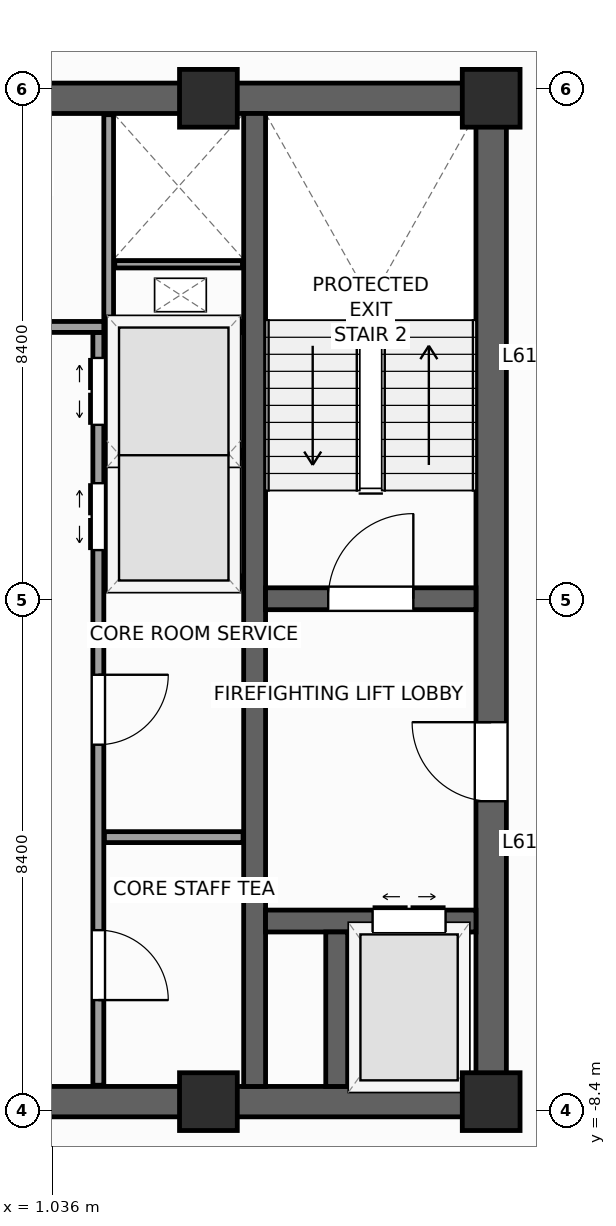
"""IFC4 building model, lengths in metres.
Left out: names, types, materials, properties, quantities, classifications, styles, units other than length and angle.
Written with IfcOpenShell. Run it as: python <this file> out.ifc"""

import sys

from ifc_helpers import new_model, si_unit, direction, frame, frame_2d, origin, origin_2d, place, context, subcontext, project, spatial, rectangle, extrude, source, transform, mapped, element, fill, save


model = new_model("IFC4")
c1 = context("Model", 3, precision=1e-05, world=origin(), true_north=direction((0.0, 1.0)))
c2 = subcontext(c1, "Body", "Model", "MODEL_VIEW")
j1 = project(units=[si_unit("LENGTHUNIT", "METRE"), si_unit("PLANEANGLEUNIT", "RADIAN")], contexts=[c1])
p1 = place(None, origin())
s1 = spatial("IfcSite", under=j1, at=p1, CompositionType="ELEMENT")
p2 = place(p1, origin())
s2 = spatial("IfcBuilding", under=s1, at=p2, CompositionType="ELEMENT")
p3 = place(p2, frame((0.0, 0.0, 252.4)))
s3 = spatial("IfcBuildingStorey", under=s2, at=p3, CompositionType="ELEMENT", Elevation=252.4)
p4 = place(p3, frame((-8.5, -8.25, 0.0), z_axis=(0.0, 0.0, 1.0), x_axis=(1.0, 0.0, 0.0)))
e1 = element("IfcWall", 1, at=p4, inside=s3, PredefinedType="SHEAR", context=c2, shape_type="SweptSolid", body=[
    extrude(rectangle(XDim=17.0, YDim=0.5, at=frame_2d((8.5, 0.0))), origin(), (0.0, 0.0, 1.0), 3.9),
])
p5 = place(p4, frame((7.85, 0.0, 0.0)))
e2 = element("IfcOpeningElement", 2, at=p5, cuts=e1, PredefinedType="OPENING", context=c2, shape_type="SweptSolid", body=[
    extrude(rectangle(XDim=1.3, YDim=2.2, at=frame_2d((0.65, 1.1))), frame((0.0, 0.26, 0.0), z_axis=(0.0, -1.0, 0.0), x_axis=(1.0, 0.0, 0.0)), (0.0, 0.0, 1.0), 0.52),
])
p6 = place(p3, frame((-8.5, 8.25, 0.0), z_axis=(0.0, 0.0, 1.0), x_axis=(1.0, 0.0, 0.0)))
e3 = element("IfcWall", 3, at=p6, inside=s3, PredefinedType="SHEAR", context=c2, shape_type="SweptSolid", body=[
    extrude(rectangle(XDim=17.0, YDim=0.5, at=frame_2d((8.5, 0.0))), origin(), (0.0, 0.0, 1.0), 3.9),
])
p7 = place(p3, frame((8.25, -8.0, 0.0), z_axis=(0.0, 0.0, 1.0), x_axis=(0.0, 1.0, 0.0)))
e4 = element("IfcWall", 4, at=p7, inside=s3, PredefinedType="SHEAR", context=c2, shape_type="SweptSolid", body=[
    extrude(rectangle(XDim=16.0, YDim=0.5, at=frame_2d((8.0, 0.0))), origin(), (0.0, 0.0, 1.0), 3.9),
])
p8 = place(p7, frame((4.69, 0.0, 0.0)))
e5 = element("IfcOpeningElement", 5, at=p8, cuts=e4, PredefinedType="OPENING", context=c2, shape_type="SweptSolid", body=[
    extrude(rectangle(XDim=1.3, YDim=2.2, at=frame_2d((0.65, 1.1))), frame((0.0, 0.26, 0.0), z_axis=(0.0, -1.0, 0.0), x_axis=(1.0, 0.0, 0.0)), (0.0, 0.0, 1.0), 0.52),
])
p9 = place(p3, frame((4.36, -8.0, 0.0), z_axis=(0.0, 0.0, 1.0), x_axis=(0.0, 1.0, 0.0)))
e6 = element("IfcWall", 6, at=p9, inside=s3, PredefinedType="SHEAR", context=c2, shape_type="SweptSolid", body=[
    extrude(rectangle(XDim=16.0, YDim=0.36, at=frame_2d((8.0, 0.0))), origin(), (0.0, 0.0, 1.0), 3.9),
])
p10 = place(p3, frame((4.54, 0.02, 0.0), z_axis=(0.0, 0.0, 1.0), x_axis=(1.0, 0.0, 0.0)))
e7 = element("IfcWall", 7, at=p10, inside=s3, PredefinedType="SHEAR", context=c2, shape_type="SweptSolid", body=[
    extrude(rectangle(XDim=3.46, YDim=0.36, at=frame_2d((1.73, 0.0))), origin(), (0.0, 0.0, 1.0), 3.9),
])
p11 = place(p10, frame((1.03, 0.0, 0.0)))
e8 = element("IfcOpeningElement", 8, at=p11, cuts=e7, PredefinedType="OPENING", context=c2, shape_type="SweptSolid", body=[
    extrude(rectangle(XDim=1.4, YDim=2.2, at=frame_2d((0.7, 1.1))), frame((0.0, 0.19, 0.0), z_axis=(0.0, -1.0, 0.0), x_axis=(1.0, 0.0, 0.0)), (0.0, 0.0, 1.0), 0.38),
])
p12 = place(p3, frame((4.54, -5.28, 0.0), z_axis=(0.0, 0.0, 1.0), x_axis=(1.0, 0.0, 0.0)))
e9 = element("IfcWall", 9, at=p12, inside=s3, PredefinedType="SHEAR", context=c2, shape_type="SweptSolid", body=[
    extrude(rectangle(XDim=3.46, YDim=0.36, at=frame_2d((1.73, 0.0))), origin(), (0.0, 0.0, 1.0), 3.9),
])
p13 = place(p12, frame((1.76, 0.0, 0.0)))
e10 = element("IfcOpeningElement", 10, at=p13, cuts=e9, PredefinedType="OPENING", context=c2, shape_type="SweptSolid", body=[
    extrude(rectangle(XDim=1.2, YDim=2.25, at=frame_2d((0.6, 1.125))), frame((0.0, 0.19, 0.0), z_axis=(0.0, -1.0, 0.0), x_axis=(1.0, 0.0, 0.0)), (0.0, 0.0, 1.0), 0.38),
])
p14 = place(p3, frame((5.71, -8.0, 0.0), z_axis=(0.0, 0.0, 1.0), x_axis=(0.0, 1.0, 0.0)))
e11 = element("IfcWall", 11, at=p14, inside=s3, PredefinedType="SHEAR", context=c2, shape_type="SweptSolid", body=[
    extrude(rectangle(XDim=2.54, YDim=0.36, at=frame_2d((1.27, 0.0))), origin(), (0.0, 0.0, 1.0), 3.9),
])
m1 = source(origin(), c2, "Body", "SweptSolid", [
    extrude(rectangle(XDim=0.95, YDim=0.95, at=origin_2d()), origin(), (0.0, 0.0, 1.0), 3.9),
])
for number, where, z_axis, x_axis in (
    (12, (8.25, -8.25, 0.0), (0.0, 0.0, 1.0), (1.0, 0.0, 0.0)),
    (13, (8.25, 8.25, 0.0), (0.0, 0.0, 1.0), (1.0, 0.0, 0.0)),
    (14, (3.6, -8.25, 0.0), (0.0, 0.0, 1.0), (1.0, 0.0, 0.0)),
    (15, (3.6, 8.25, 0.0), (0.0, 0.0, 1.0), (1.0, 0.0, 0.0)),
):
    element("IfcColumn", number, at=place(p3, frame(where, z_axis=z_axis, x_axis=x_axis)), inside=s3, PredefinedType="PILASTER", context=c2, shape_type="MappedRepresentation", body=[
        mapped(m1, transform((0.0, 0.0, 0.0), scale=1.0)),
    ])
p15 = place(p3, frame((6.733, -29.154, 0.0), z_axis=(0.0, 0.0, 1.0), x_axis=(0.629325378072, 0.77714192302, 0.0)))
e16 = element("IfcWall", 16, at=p15, inside=s3, PredefinedType="STANDARD", context=c2, shape_type="SweptSolid", body=[
    extrude(rectangle(XDim=36.84, YDim=0.34, at=frame_2d((18.42, 0.0))), origin(), (0.0, 0.0, 1.0), 2.96),
])
p16 = place(p15, frame((3.721, 0.0, 0.48)))
e17 = element("IfcOpeningElement", 17, at=p16, cuts=e16, PredefinedType="OPENING", context=c2, shape_type="SweptSolid", body=[
    extrude(rectangle(XDim=1.4, YDim=2.4, at=frame_2d((0.7, 1.2))), frame((0.0, 0.18, 0.0), z_axis=(0.0, -1.0, 0.0), x_axis=(1.0, 0.0, 0.0)), (0.0, 0.0, 1.0), 0.36),
])
p17 = place(p15, frame((10.559, 0.0, 0.58)))
e18 = element("IfcOpeningElement", 18, at=p17, cuts=e16, PredefinedType="OPENING", context=c2, shape_type="SweptSolid", body=[
    extrude(rectangle(XDim=1.75, YDim=2.3, at=frame_2d((0.875, 1.15))), frame((0.0, 0.18, 0.0), z_axis=(0.0, -1.0, 0.0), x_axis=(1.0, 0.0, 0.0)), (0.0, 0.0, 1.0), 0.36),
])
p18 = place(p15, frame((16.058, 0.0, 0.58)))
e19 = element("IfcOpeningElement", 19, at=p18, cuts=e16, PredefinedType="OPENING", context=c2, shape_type="SweptSolid", body=[
    extrude(rectangle(XDim=1.75, YDim=2.3, at=frame_2d((0.875, 1.15))), frame((0.0, 0.18, 0.0), z_axis=(0.0, -1.0, 0.0), x_axis=(1.0, 0.0, 0.0)), (0.0, 0.0, 1.0), 0.36),
])
p19 = place(p15, frame((24.176, 0.0, 0.58)))
e20 = element("IfcOpeningElement", 20, at=p19, cuts=e16, PredefinedType="OPENING", context=c2, shape_type="SweptSolid", body=[
    extrude(rectangle(XDim=1.75, YDim=2.3, at=frame_2d((0.875, 1.15))), frame((0.0, 0.18, 0.0), z_axis=(0.0, -1.0, 0.0), x_axis=(1.0, 0.0, 0.0)), (0.0, 0.0, 1.0), 0.36),
])
p20 = place(p15, frame((30.982, 0.0, 0.48)))
e21 = element("IfcOpeningElement", 21, at=p20, cuts=e16, PredefinedType="OPENING", context=c2, shape_type="SweptSolid", body=[
    extrude(rectangle(XDim=1.4, YDim=2.4, at=frame_2d((0.7, 1.2))), frame((0.0, 0.18, 0.0), z_axis=(0.0, -1.0, 0.0), x_axis=(1.0, 0.0, 0.0)), (0.0, 0.0, 1.0), 0.36),
])
p21 = place(p3, frame((29.154, 6.733, 0.0), z_axis=(0.0, 0.0, 1.0), x_axis=(-0.77714192302, 0.629325378072, 0.0)))
e22 = element("IfcWall", 22, at=p21, inside=s3, PredefinedType="STANDARD", context=c2, shape_type="SweptSolid", body=[
    extrude(rectangle(XDim=36.84, YDim=0.34, at=frame_2d((18.42, 0.0))), origin(), (0.0, 0.0, 1.0), 2.96),
])
p22 = place(p21, frame((23.495, 0.0, 0.0)))
e23 = element("IfcOpeningElement", 23, at=p22, cuts=e22, PredefinedType="OPENING", context=c2, shape_type="SweptSolid", body=[
    extrude(rectangle(XDim=1.05, YDim=2.25, at=frame_2d((0.525, 1.125))), frame((0.0, 0.18, 0.0), z_axis=(0.0, -1.0, 0.0), x_axis=(1.0, 0.0, 0.0)), (0.0, 0.0, 1.0), 0.36),
])
p23 = place(p21, frame((3.721, 0.0, 0.48)))
e24 = element("IfcOpeningElement", 24, at=p23, cuts=e22, PredefinedType="OPENING", context=c2, shape_type="SweptSolid", body=[
    extrude(rectangle(XDim=1.4, YDim=2.4, at=frame_2d((0.7, 1.2))), frame((0.0, 0.18, 0.0), z_axis=(0.0, -1.0, 0.0), x_axis=(1.0, 0.0, 0.0)), (0.0, 0.0, 1.0), 0.36),
])
p24 = place(p21, frame((9.809, 0.0, 0.58)))
e25 = element("IfcOpeningElement", 25, at=p24, cuts=e22, PredefinedType="OPENING", context=c2, shape_type="SweptSolid", body=[
    extrude(rectangle(XDim=1.75, YDim=2.3, at=frame_2d((0.875, 1.15))), frame((0.0, 0.18, 0.0), z_axis=(0.0, -1.0, 0.0), x_axis=(1.0, 0.0, 0.0)), (0.0, 0.0, 1.0), 0.36),
])
p25 = place(p21, frame((16.058, 0.0, 0.58)))
e26 = element("IfcOpeningElement", 26, at=p25, cuts=e22, PredefinedType="OPENING", context=c2, shape_type="SweptSolid", body=[
    extrude(rectangle(XDim=1.75, YDim=2.3, at=frame_2d((0.875, 1.15))), frame((0.0, 0.18, 0.0), z_axis=(0.0, -1.0, 0.0), x_axis=(1.0, 0.0, 0.0)), (0.0, 0.0, 1.0), 0.36),
])
p26 = place(p21, frame((25.676, 0.0, 0.58)))
e27 = element("IfcOpeningElement", 27, at=p26, cuts=e22, PredefinedType="OPENING", context=c2, shape_type="SweptSolid", body=[
    extrude(rectangle(XDim=1.75, YDim=2.3, at=frame_2d((0.875, 1.15))), frame((0.0, 0.18, 0.0), z_axis=(0.0, -1.0, 0.0), x_axis=(1.0, 0.0, 0.0)), (0.0, 0.0, 1.0), 0.36),
])
p27 = place(p21, frame((31.732, 0.0, 0.48)))
e28 = element("IfcOpeningElement", 28, at=p27, cuts=e22, PredefinedType="OPENING", context=c2, shape_type="SweptSolid", body=[
    extrude(rectangle(XDim=1.4, YDim=2.4, at=frame_2d((0.7, 1.2))), frame((0.0, 0.18, 0.0), z_axis=(0.0, -1.0, 0.0), x_axis=(1.0, 0.0, 0.0)), (0.0, 0.0, 1.0), 0.36),
])
p28 = place(p3, frame((1.79, -7.98, 0.0), z_axis=(0.0, 0.0, 1.0), x_axis=(0.0, 1.0, 0.0)))
e29 = element("IfcWall", 29, at=p28, inside=s3, PredefinedType="PARTITIONING", context=c2, shape_type="SweptSolid", body=[
    extrude(rectangle(XDim=12.38, YDim=0.18, at=frame_2d((6.19, 0.0))), origin(), (0.0, 0.0, 1.0), 3.66),
])
p29 = place(p28, frame((8.8, 0.0, 0.0)))
e30 = element("IfcOpeningElement", 30, at=p29, cuts=e29, PredefinedType="OPENING", context=c2, shape_type="SweptSolid", body=[
    extrude(rectangle(XDim=1.1, YDim=2.2, at=frame_2d((0.55, 1.1))), frame((0.0, 0.1, 0.0), z_axis=(0.0, -1.0, 0.0), x_axis=(1.0, 0.0, 0.0)), (0.0, 0.0, 1.0), 0.2),
])
p30 = place(p28, frame((10.86, 0.0, 0.0)))
e31 = element("IfcOpeningElement", 31, at=p30, cuts=e29, PredefinedType="OPENING", context=c2, shape_type="SweptSolid", body=[
    extrude(rectangle(XDim=1.1, YDim=2.2, at=frame_2d((0.55, 1.1))), frame((0.0, 0.1, 0.0), z_axis=(0.0, -1.0, 0.0), x_axis=(1.0, 0.0, 0.0)), (0.0, 0.0, 1.0), 0.2),
])
p31 = place(p28, frame((1.4, 0.0, 0.0)))
e32 = element("IfcOpeningElement", 32, at=p31, cuts=e29, PredefinedType="OPENING", context=c2, shape_type="SweptSolid", body=[
    extrude(rectangle(XDim=1.15, YDim=2.25, at=frame_2d((0.575, 1.125))), frame((0.0, 0.1, 0.0), z_axis=(0.0, -1.0, 0.0), x_axis=(1.0, 0.0, 0.0)), (0.0, 0.0, 1.0), 0.2),
])
p32 = place(p28, frame((5.6, 0.0, 0.0)))
e33 = element("IfcOpeningElement", 33, at=p32, cuts=e29, PredefinedType="OPENING", context=c2, shape_type="SweptSolid", body=[
    extrude(rectangle(XDim=1.15, YDim=2.25, at=frame_2d((0.575, 1.125))), frame((0.0, 0.1, 0.0), z_axis=(0.0, -1.0, 0.0), x_axis=(1.0, 0.0, 0.0)), (0.0, 0.0, 1.0), 0.2),
])
p33 = place(p3, frame((-1.88, 4.49, 0.0), z_axis=(0.0, 0.0, 1.0), x_axis=(1.0, 0.0, 0.0)))
e34 = element("IfcWall", 34, at=p33, inside=s3, PredefinedType="PARTITIONING", context=c2, shape_type="SweptSolid", body=[
    extrude(rectangle(XDim=3.76, YDim=0.18, at=frame_2d((1.88, 0.0))), origin(), (0.0, 0.0, 1.0), 3.66),
])
p34 = place(p33, frame((1.305, 0.0, 0.0)))
e35 = element("IfcOpeningElement", 35, at=p34, cuts=e34, PredefinedType="OPENING", context=c2, shape_type="SweptSolid", body=[
    extrude(rectangle(XDim=1.15, YDim=2.25, at=frame_2d((0.575, 1.125))), frame((0.0, 0.1, 0.0), z_axis=(0.0, -1.0, 0.0), x_axis=(1.0, 0.0, 0.0)), (0.0, 0.0, 1.0), 0.2),
])
for number, where, z_axis, x_axis in (
    (36, (1.89, -3.9, 0.0), (0.0, 0.0, 1.0), (1.0, 0.0, 0.0)),
    (37, (1.89, 0.3, 0.0), (0.0, 0.0, 1.0), (1.0, 0.0, 0.0)),
    (38, (1.89, 4.49, 0.0), (0.0, 0.0, 1.0), (1.0, 0.0, 0.0)),
):
    element("IfcWall", number, at=place(p3, frame(where, z_axis=z_axis, x_axis=x_axis)), inside=s3, PredefinedType="PARTITIONING", context=c2, shape_type="SweptSolid", body=[
        extrude(rectangle(XDim=2.28, YDim=0.18, at=frame_2d((1.14, 0.0))), origin(), (0.0, 0.0, 1.0), 3.66),
    ])
p35 = place(p3, frame((1.9, 2.4, 0.0), z_axis=(0.0, 0.0, 1.0), x_axis=(1.0, 0.0, 0.0)))
e39 = element("IfcWall", 39, at=p35, inside=s3, PredefinedType="PARTITIONING", context=c2, shape_type="SweptSolid", body=[
    extrude(rectangle(XDim=2.26, YDim=0.12, at=frame_2d((1.13, 0.0))), origin(), (0.0, 0.0, 1.0), 3.66),
])
p36 = place(p3, frame((1.96, 4.58, 0.0), z_axis=(0.0, 0.0, 1.0), x_axis=(0.0, 1.0, 0.0)))
e40 = element("IfcWall", 40, at=p36, inside=s3, PredefinedType="PARTITIONING", context=c2, shape_type="SweptSolid", body=[
    extrude(rectangle(XDim=3.4, YDim=0.16, at=frame_2d((1.7, 0.0))), origin(), (0.0, 0.0, 1.0), 3.66),
])
p37 = place(p3, frame((2.06, 5.52, 0.0), z_axis=(0.0, 0.0, 1.0), x_axis=(1.0, 0.0, 0.0)))
e41 = element("IfcWall", 41, at=p37, inside=s3, PredefinedType="PARTITIONING", context=c2, shape_type="SweptSolid", body=[
    extrude(rectangle(XDim=2.1, YDim=0.12, at=frame_2d((1.05, 0.0))), origin(), (0.0, 0.0, 1.0), 3.66),
])
m2 = source(origin(), c2, "Body", "SweptSolid", [
    extrude(rectangle(XDim=1.4, YDim=2.2, at=frame_2d((0.7, 1.1))), frame((0.0, 0.025, 0.0), z_axis=(0.0, -1.0, 0.0), x_axis=(1.0, 0.0, 0.0)), (0.0, 0.0, 1.0), 0.05),
])
p38 = place(p11, origin())
e42 = element("IfcDoor", 42, at=p38, inside=s3, OperationType="SINGLE_SWING_RIGHT", PredefinedType="DOOR", context=c2, shape_type="MappedRepresentation", body=[
    mapped(m2, transform((0.0, 0.0, 0.0), scale=1.0)),
])
fill(e8, e42)
m3 = source(origin(), c2, "Body", "SweptSolid", [
    extrude(rectangle(XDim=1.3, YDim=2.2, at=frame_2d((0.65, 1.1))), frame((0.0, 0.025, 0.0), z_axis=(0.0, -1.0, 0.0), x_axis=(1.0, 0.0, 0.0)), (0.0, 0.0, 1.0), 0.05),
])
p39 = place(p8, origin())
e43 = element("IfcDoor", 43, at=p39, inside=s3, OperationType="SINGLE_SWING_RIGHT", PredefinedType="DOOR", context=c2, shape_type="MappedRepresentation", body=[
    mapped(m3, transform((0.0, 0.0, 0.0), scale=1.0)),
])
fill(e5, e43)
m4 = source(origin(), c2, "Body", "SweptSolid", [
    extrude(rectangle(XDim=1.2, YDim=2.25, at=frame_2d((0.6, 1.125))), frame((0.0, 0.025, 0.0), z_axis=(0.0, -1.0, 0.0), x_axis=(1.0, 0.0, 0.0)), (0.0, 0.0, 1.0), 0.05),
])
p40 = place(p13, origin())
e44 = element("IfcDoor", 44, at=p40, inside=s3, OperationType="DOUBLE_DOOR_SLIDING", PredefinedType="DOOR", context=c2, shape_type="MappedRepresentation", body=[
    mapped(m4, transform((0.0, 0.0, 0.0), scale=1.0)),
])
fill(e10, e44)
m5 = source(origin(), c2, "Body", "SweptSolid", [
    extrude(rectangle(XDim=1.1, YDim=2.2, at=frame_2d((0.55, 1.1))), frame((0.0, 0.025, 0.0), z_axis=(0.0, -1.0, 0.0), x_axis=(1.0, 0.0, 0.0)), (0.0, 0.0, 1.0), 0.05),
])
p41 = place(p29, origin())
e45 = element("IfcDoor", 45, at=p41, inside=s3, OperationType="DOUBLE_DOOR_SLIDING", PredefinedType="DOOR", context=c2, shape_type="MappedRepresentation", body=[
    mapped(m5, transform((0.0, 0.0, 0.0), scale=1.0)),
])
fill(e30, e45)
p42 = place(p30, origin())
e46 = element("IfcDoor", 46, at=p42, inside=s3, OperationType="DOUBLE_DOOR_SLIDING", PredefinedType="DOOR", context=c2, shape_type="MappedRepresentation", body=[
    mapped(m5, transform((0.0, 0.0, 0.0), scale=1.0)),
])
fill(e31, e46)
m6 = source(origin(), c2, "Body", "SweptSolid", [
    extrude(rectangle(XDim=1.15, YDim=2.25, at=frame_2d((0.575, 1.125))), frame((0.0, 0.025, 0.0), z_axis=(0.0, -1.0, 0.0), x_axis=(1.0, 0.0, 0.0)), (0.0, 0.0, 1.0), 0.05),
])
p43 = place(p31, frame((1.15, 0.0, 0.0), z_axis=(0.0, 0.0, 1.0), x_axis=(-1.0, 0.0, 0.0)))
e47 = element("IfcDoor", 47, at=p43, inside=s3, OperationType="SINGLE_SWING_LEFT", PredefinedType="DOOR", context=c2, shape_type="MappedRepresentation", body=[
    mapped(m6, transform((0.0, 0.0, 0.0), scale=1.0)),
])
fill(e32, e47)
p44 = place(p32, frame((1.15, 0.0, 0.0), z_axis=(0.0, 0.0, 1.0), x_axis=(-1.0, 0.0, 0.0)))
e48 = element("IfcDoor", 48, at=p44, inside=s3, OperationType="SINGLE_SWING_RIGHT", PredefinedType="DOOR", context=c2, shape_type="MappedRepresentation", body=[
    mapped(m6, transform((0.0, 0.0, 0.0), scale=1.0)),
])
fill(e33, e48)
save(model, sys.argv[1])
